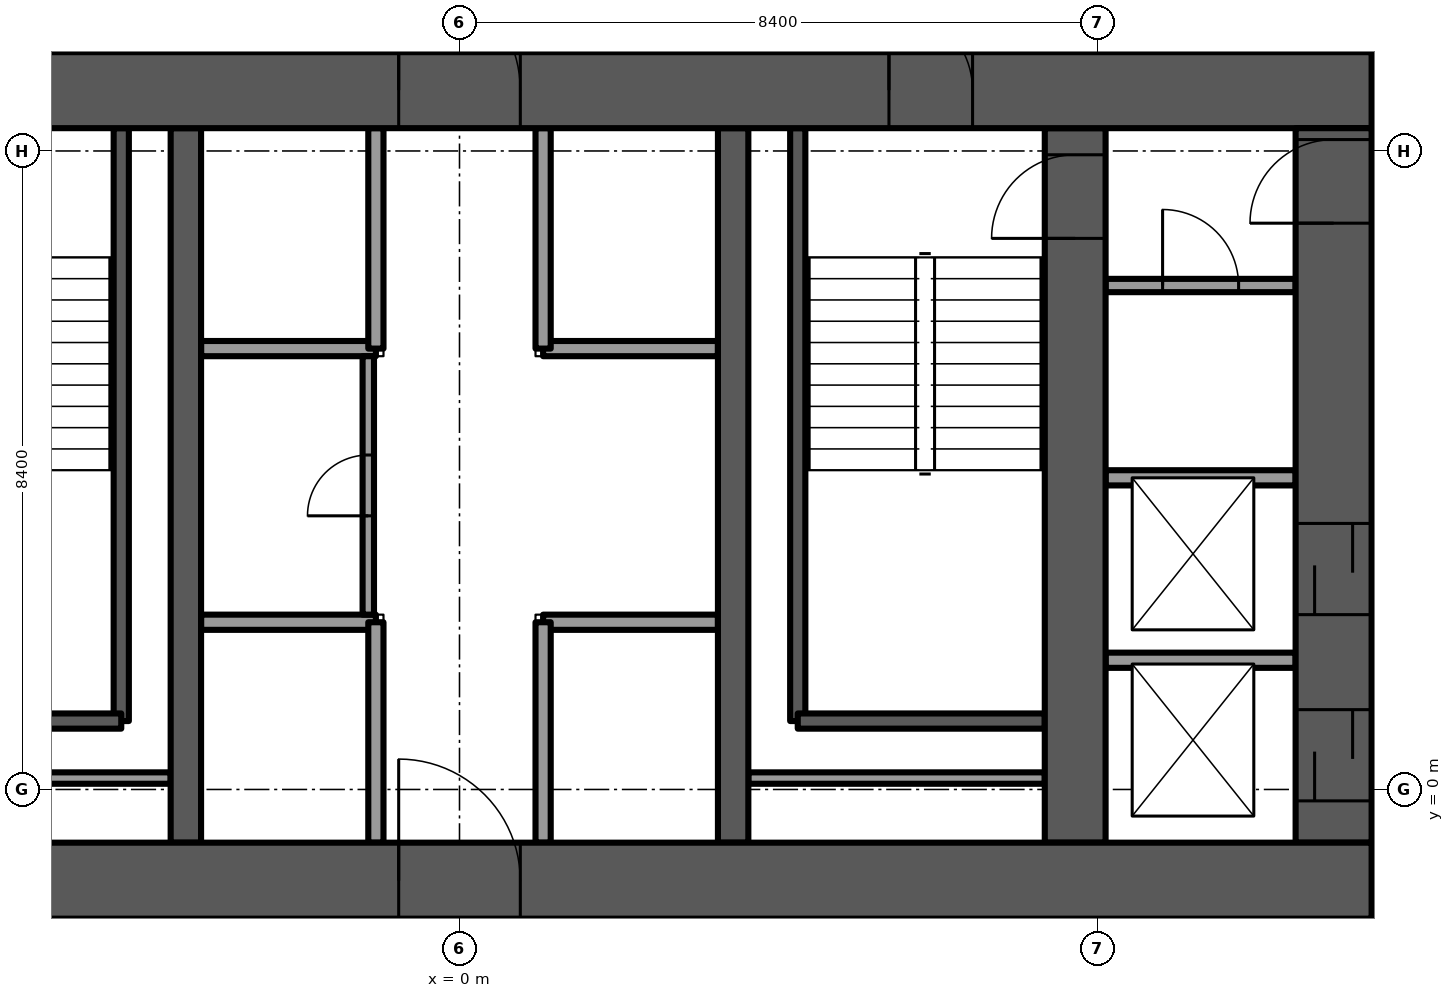
"""IFC4 building model, lengths in metres.
Left out: names, types, materials, properties, quantities, classifications, styles, units other than length and angle.
Written with IfcOpenShell. Run it as: python <this file> out.ifc"""

import sys

from ifc_helpers import new_model, si_unit, direction, frame, frame_2d, origin, place, context, subcontext, project, spatial, rectangle, extrude, element, fill, save


model = new_model("IFC4")
c1 = context("Model", 3, precision=1e-05, world=origin(), true_north=direction((0.0, 1.0)))
c2 = subcontext(c1, "Body", "Model", "MODEL_VIEW")
j1 = project(units=[si_unit("LENGTHUNIT", "METRE"), si_unit("PLANEANGLEUNIT", "RADIAN")], contexts=[c1])
p1 = place(None, origin())
s1 = spatial("IfcSite", under=j1, at=p1, CompositionType="ELEMENT")
p2 = place(p1, origin())
s2 = spatial("IfcBuilding", under=s1, at=p2, CompositionType="ELEMENT")
p3 = place(p2, frame((0.0, 0.0, 116.0)))
s3 = spatial("IfcBuildingStorey", under=s2, at=p3, CompositionType="ELEMENT", Elevation=116.0)
p4 = place(p3, frame((-12.0, -1.2, -0.3), z_axis=(0.0, 0.0, 1.0), x_axis=(1.0, 0.0, 0.0)))
e1 = element("IfcWall", 1, at=p4, inside=s3, PredefinedType="SHEAR", context=c2, shape_type="SweptSolid", body=[
    extrude(rectangle(XDim=24.0, YDim=1.0, at=frame_2d((12.0, 0.0))), origin(), (0.0, 0.0, 1.0), 3.75),
])
p5 = place(p4, frame((11.2, 0.0, 0.0)))
e2 = element("IfcOpeningElement", 2, at=p5, cuts=e1, PredefinedType="OPENING", context=c2, shape_type="SweptSolid", body=[
    extrude(rectangle(XDim=1.6, YDim=2.1, at=frame_2d((0.8, 1.05))), frame((0.0, 0.5, 0.0), z_axis=(0.0, -1.0, 0.0), x_axis=(1.0, 0.0, 0.0)), (0.0, 0.0, 1.0), 1.0),
])
p6 = place(p3, frame((-12.0, 9.2, -0.3), z_axis=(0.0, 0.0, 1.0), x_axis=(1.0, 0.0, 0.0)))
e3 = element("IfcWall", 3, at=p6, inside=s3, PredefinedType="SHEAR", context=c2, shape_type="SweptSolid", body=[
    extrude(rectangle(XDim=24.0, YDim=1.0, at=frame_2d((12.0, 0.0))), origin(), (0.0, 0.0, 1.0), 3.75),
])
p7 = place(p6, frame((11.2, 0.0, 0.0)))
e4 = element("IfcOpeningElement", 4, at=p7, cuts=e3, PredefinedType="OPENING", context=c2, shape_type="SweptSolid", body=[
    extrude(rectangle(XDim=1.6, YDim=2.1, at=frame_2d((0.8, 1.05))), frame((0.0, 0.5, 0.0), z_axis=(0.0, -1.0, 0.0), x_axis=(1.0, 0.0, 0.0)), (0.0, 0.0, 1.0), 1.0),
])
p8 = place(p6, frame((5.25, 0.0, 0.0)))
e5 = element("IfcOpeningElement", 5, at=p8, cuts=e3, PredefinedType="OPENING", context=c2, shape_type="SweptSolid", body=[
    extrude(rectangle(XDim=1.1, YDim=2.1, at=frame_2d((0.55, 1.05))), frame((0.0, 0.5, 0.0), z_axis=(0.0, -1.0, 0.0), x_axis=(1.0, 0.0, 0.0)), (0.0, 0.0, 1.0), 1.0),
])
p9 = place(p6, frame((17.65, 0.0, 0.0)))
e6 = element("IfcOpeningElement", 6, at=p9, cuts=e3, PredefinedType="OPENING", context=c2, shape_type="SweptSolid", body=[
    extrude(rectangle(XDim=1.1, YDim=2.1, at=frame_2d((0.55, 1.05))), frame((0.0, 0.5, 0.0), z_axis=(0.0, -1.0, 0.0), x_axis=(1.0, 0.0, 0.0)), (0.0, 0.0, 1.0), 1.0),
])
p10 = place(p3, frame((8.1, -0.7, -0.3), z_axis=(0.0, 0.0, 1.0), x_axis=(0.0, 1.0, 0.0)))
e7 = element("IfcWall", 7, at=p10, inside=s3, PredefinedType="SHEAR", context=c2, shape_type="SweptSolid", body=[
    extrude(rectangle(XDim=9.4, YDim=0.8, at=frame_2d((4.7, 0.0))), origin(), (0.0, 0.0, 1.0), 3.75),
])
p11 = place(p10, frame((7.95, 0.0, 0.0)))
e8 = element("IfcOpeningElement", 8, at=p11, cuts=e7, PredefinedType="OPENING", context=c2, shape_type="SweptSolid", body=[
    extrude(rectangle(XDim=1.1, YDim=2.1, at=frame_2d((0.55, 1.05))), frame((0.0, 0.4, 0.0), z_axis=(0.0, -1.0, 0.0), x_axis=(1.0, 0.0, 0.0)), (0.0, 0.0, 1.0), 0.8),
])
for number, where, z_axis, x_axis in (
    (9, (-3.6, -0.7, -0.3), (0.0, 0.0, 1.0), (0.0, 1.0, 0.0)),
    (10, (3.6, -0.7, -0.3), (0.0, 0.0, 1.0), (0.0, 1.0, 0.0)),
):
    element("IfcWall", number, at=place(p3, frame(where, z_axis=z_axis, x_axis=x_axis)), inside=s3, PredefinedType="SHEAR", context=c2, shape_type="SweptSolid", body=[
        extrude(rectangle(XDim=9.4, YDim=0.4, at=frame_2d((4.7, 0.0))), origin(), (0.0, 0.0, 1.0), 3.75),
    ])
p12 = place(p3, frame((11.5, -0.7, -0.3), z_axis=(0.0, 0.0, 1.0), x_axis=(0.0, 1.0, 0.0)))
e11 = element("IfcWall", 11, at=p12, inside=s3, PredefinedType="SHEAR", context=c2, shape_type="SweptSolid", body=[
    extrude(rectangle(XDim=9.4, YDim=1.0, at=frame_2d((4.7, 0.0))), origin(), (0.0, 0.0, 1.0), 3.75),
])
p13 = place(p12, frame((8.15, 0.0, 0.0)))
e12 = element("IfcOpeningElement", 12, at=p13, cuts=e11, PredefinedType="OPENING", context=c2, shape_type="SweptSolid", body=[
    extrude(rectangle(XDim=1.1, YDim=2.1, at=frame_2d((0.55, 1.05))), frame((0.0, 0.5, 0.0), z_axis=(0.0, -1.0, 0.0), x_axis=(1.0, 0.0, 0.0)), (0.0, 0.0, 1.0), 1.0),
])
p14 = place(p12, frame((0.55, 0.0, 0.0)))
e13 = element("IfcOpeningElement", 13, at=p14, cuts=e11, PredefinedType="OPENING", context=c2, shape_type="SweptSolid", body=[
    extrude(rectangle(XDim=1.2, YDim=2.1, at=frame_2d((0.6, 1.05))), frame((0.0, 0.5, 0.0), z_axis=(0.0, -1.0, 0.0), x_axis=(1.0, 0.0, 0.0)), (0.0, 0.0, 1.0), 1.0),
])
p15 = place(p12, frame((3.0, 0.0, 0.0)))
e14 = element("IfcOpeningElement", 14, at=p15, cuts=e11, PredefinedType="OPENING", context=c2, shape_type="SweptSolid", body=[
    extrude(rectangle(XDim=1.2, YDim=2.1, at=frame_2d((0.6, 1.05))), frame((0.0, 0.5, 0.0), z_axis=(0.0, -1.0, 0.0), x_axis=(1.0, 0.0, 0.0)), (0.0, 0.0, 1.0), 1.0),
])
p16 = place(p3, frame((10.463, -15.727, 0.0), z_axis=(0.0, 0.0, 1.0), x_axis=(0.499992448691, 0.866029763491, 0.0)))
e15 = element("IfcWall", 15, at=p16, inside=s3, PredefinedType="SOLIDWALL", context=c2, shape_type="SweptSolid", body=[
    extrude(rectangle(XDim=16.777, YDim=0.15, at=frame_2d((8.388, 0.0))), origin(), (0.0, 0.0, 1.0), 3.45),
])
p17 = place(p16, frame((2.388, 0.0, 0.15)))
e16 = element("IfcOpeningElement", 16, at=p17, cuts=e15, PredefinedType="OPENING", context=c2, shape_type="SweptSolid", body=[
    extrude(rectangle(XDim=1.7, YDim=2.85, at=frame_2d((0.85, 1.425))), frame((0.0, 0.075, 0.0), z_axis=(0.0, -1.0, 0.0), x_axis=(1.0, 0.0, 0.0)), (0.0, 0.0, 1.0), 0.15),
])
p18 = place(p16, frame((4.488, 0.0, 0.0)))
e17 = element("IfcOpeningElement", 17, at=p18, cuts=e15, PredefinedType="OPENING", context=c2, shape_type="SweptSolid", body=[
    extrude(rectangle(XDim=1.5, YDim=2.4, at=frame_2d((0.75, 1.2))), frame((0.0, 0.075, 0.0), z_axis=(0.0, -1.0, 0.0), x_axis=(1.0, 0.0, 0.0)), (0.0, 0.0, 1.0), 0.15),
])
p19 = place(p16, frame((6.588, 0.0, 0.15)))
e18 = element("IfcOpeningElement", 18, at=p19, cuts=e15, PredefinedType="OPENING", context=c2, shape_type="SweptSolid", body=[
    extrude(rectangle(XDim=1.7, YDim=2.85, at=frame_2d((0.85, 1.425))), frame((0.0, 0.075, 0.0), z_axis=(0.0, -1.0, 0.0), x_axis=(1.0, 0.0, 0.0)), (0.0, 0.0, 1.0), 0.15),
])
p20 = place(p16, frame((8.511, 0.0, 0.0)))
e19 = element("IfcOpeningElement", 19, at=p20, cuts=e15, PredefinedType="OPENING", context=c2, shape_type="SweptSolid", body=[
    extrude(rectangle(XDim=1.5, YDim=2.4, at=frame_2d((0.75, 1.2))), frame((0.0, 0.075, 0.0), z_axis=(0.0, -1.0, 0.0), x_axis=(1.0, 0.0, 0.0)), (0.0, 0.0, 1.0), 0.15),
])
p21 = place(p16, frame((12.063, 0.0, 0.15)))
e20 = element("IfcOpeningElement", 20, at=p21, cuts=e15, PredefinedType="OPENING", context=c2, shape_type="SweptSolid", body=[
    extrude(rectangle(XDim=1.5, YDim=2.85, at=frame_2d((0.75, 1.425))), frame((0.0, 0.075, 0.0), z_axis=(0.0, -1.0, 0.0), x_axis=(1.0, 0.0, 0.0)), (0.0, 0.0, 1.0), 0.15),
])
p22 = place(p16, frame((0.544, 0.0, 0.15)))
e21 = element("IfcOpeningElement", 21, at=p22, cuts=e15, PredefinedType="OPENING", context=c2, shape_type="SweptSolid", body=[
    extrude(rectangle(XDim=0.9, YDim=2.73, at=frame_2d((0.45, 1.365))), frame((0.0, 0.075, 0.0), z_axis=(0.0, -1.0, 0.0), x_axis=(1.0, 0.0, 0.0)), (0.0, 0.0, 1.0), 0.15),
])
p23 = place(p16, frame((15.333, 0.0, 0.15)))
e22 = element("IfcOpeningElement", 22, at=p23, cuts=e15, PredefinedType="OPENING", context=c2, shape_type="SweptSolid", body=[
    extrude(rectangle(XDim=0.9, YDim=2.73, at=frame_2d((0.45, 1.365))), frame((0.0, 0.075, 0.0), z_axis=(0.0, -1.0, 0.0), x_axis=(1.0, 0.0, 0.0)), (0.0, 0.0, 1.0), 0.15),
])
p24 = place(p3, frame((18.852, -0.133, 0.0), z_axis=(0.0, 0.0, 1.0), x_axis=(-0.499994842654, 0.866028381359, 0.0)))
e23 = element("IfcWall", 23, at=p24, inside=s3, PredefinedType="SOLIDWALL", context=c2, shape_type="SweptSolid", body=[
    extrude(rectangle(XDim=21.853, YDim=0.15, at=frame_2d((10.927, 0.0))), origin(), (0.0, 0.0, 1.0), 3.45),
])
p25 = place(p24, frame((1.441, 0.0, 0.15)))
e24 = element("IfcOpeningElement", 24, at=p25, cuts=e23, PredefinedType="OPENING", context=c2, shape_type="SweptSolid", body=[
    extrude(rectangle(XDim=1.7, YDim=2.85, at=frame_2d((0.85, 1.425))), frame((0.0, 0.075, 0.0), z_axis=(0.0, -1.0, 0.0), x_axis=(1.0, 0.0, 0.0)), (0.0, 0.0, 1.0), 0.15),
])
p26 = place(p24, frame((3.541, 0.0, 0.15)))
e25 = element("IfcOpeningElement", 25, at=p26, cuts=e23, PredefinedType="OPENING", context=c2, shape_type="SweptSolid", body=[
    extrude(rectangle(XDim=1.5, YDim=2.85, at=frame_2d((0.75, 1.425))), frame((0.0, 0.075, 0.0), z_axis=(0.0, -1.0, 0.0), x_axis=(1.0, 0.0, 0.0)), (0.0, 0.0, 1.0), 0.15),
])
p27 = place(p24, frame((5.641, 0.0, 0.15)))
e26 = element("IfcOpeningElement", 26, at=p27, cuts=e23, PredefinedType="OPENING", context=c2, shape_type="SweptSolid", body=[
    extrude(rectangle(XDim=1.7, YDim=2.85, at=frame_2d((0.85, 1.425))), frame((0.0, 0.075, 0.0), z_axis=(0.0, -1.0, 0.0), x_axis=(1.0, 0.0, 0.0)), (0.0, 0.0, 1.0), 0.15),
])
p28 = place(p24, frame((7.741, 0.0, 0.15)))
e27 = element("IfcOpeningElement", 27, at=p28, cuts=e23, PredefinedType="OPENING", context=c2, shape_type="SweptSolid", body=[
    extrude(rectangle(XDim=1.5, YDim=2.85, at=frame_2d((0.75, 1.425))), frame((0.0, 0.075, 0.0), z_axis=(0.0, -1.0, 0.0), x_axis=(1.0, 0.0, 0.0)), (0.0, 0.0, 1.0), 0.15),
])
p29 = place(p24, frame((10.531, 0.0, 0.15)))
e28 = element("IfcOpeningElement", 28, at=p29, cuts=e23, PredefinedType="OPENING", context=c2, shape_type="SweptSolid", body=[
    extrude(rectangle(XDim=0.9, YDim=2.85, at=frame_2d((0.45, 1.425))), frame((0.0, 0.075, 0.0), z_axis=(0.0, -1.0, 0.0), x_axis=(1.0, 0.0, 0.0)), (0.0, 0.0, 1.0), 0.15),
])
p30 = place(p24, frame((14.041, 0.0, 0.15)))
e29 = element("IfcOpeningElement", 29, at=p30, cuts=e23, PredefinedType="OPENING", context=c2, shape_type="SweptSolid", body=[
    extrude(rectangle(XDim=0.9, YDim=2.85, at=frame_2d((0.45, 1.425))), frame((0.0, 0.075, 0.0), z_axis=(0.0, -1.0, 0.0), x_axis=(1.0, 0.0, 0.0)), (0.0, 0.0, 1.0), 0.15),
])
p31 = place(p24, frame((19.132, 0.0, 0.15)))
e30 = element("IfcOpeningElement", 30, at=p31, cuts=e23, PredefinedType="OPENING", context=c2, shape_type="SweptSolid", body=[
    extrude(rectangle(XDim=1.7, YDim=2.73, at=frame_2d((0.85, 1.365))), frame((0.0, 0.075, 0.0), z_axis=(0.0, -1.0, 0.0), x_axis=(1.0, 0.0, 0.0)), (0.0, 0.0, 1.0), 0.15),
])
for number, where, z_axis, x_axis in (
    (31, (-3.4, 2.2, 0.0), (0.0, 0.0, 1.0), (1.0, 0.0, 0.0)),
    (32, (-3.4, 5.8, 0.0), (0.0, 0.0, 1.0), (1.0, 0.0, 0.0)),
    (33, (1.1, 2.2, 0.0), (0.0, 0.0, 1.0), (1.0, 0.0, 0.0)),
    (34, (1.1, 5.8, 0.0), (0.0, 0.0, 1.0), (1.0, 0.0, 0.0)),
):
    element("IfcWall", number, at=place(p3, frame(where, z_axis=z_axis, x_axis=x_axis)), inside=s3, PredefinedType="PARTITIONING", context=c2, shape_type="SweptSolid", body=[
        extrude(rectangle(XDim=2.3, YDim=0.2, at=frame_2d((1.15, 0.0))), origin(), (0.0, 0.0, 1.0), 3.45),
    ])
for number, where, z_axis, x_axis in (
    (35, (-1.1, -0.7, 0.0), (0.0, 0.0, 1.0), (0.0, 1.0, 0.0)),
    (36, (1.1, -0.7, 0.0), (0.0, 0.0, 1.0), (0.0, 1.0, 0.0)),
    (37, (-1.1, 5.8, 0.0), (0.0, 0.0, 1.0), (0.0, 1.0, 0.0)),
    (38, (1.1, 5.8, 0.0), (0.0, 0.0, 1.0), (0.0, 1.0, 0.0)),
):
    element("IfcWall", number, at=place(p3, frame(where, z_axis=z_axis, x_axis=x_axis)), inside=s3, PredefinedType="PARTITIONING", context=c2, shape_type="SweptSolid", body=[
        extrude(rectangle(XDim=2.9, YDim=0.2, at=frame_2d((1.45, 0.0))), origin(), (0.0, 0.0, 1.0), 3.45),
    ])
p32 = place(p3, frame((-4.45, 0.9, -0.3), z_axis=(0.0, 0.0, 1.0), x_axis=(0.0, 1.0, 0.0)))
e39 = element("IfcWall", 39, at=p32, inside=s3, PredefinedType="SOLIDWALL", context=c2, shape_type="SweptSolid", body=[
    extrude(rectangle(XDim=7.8, YDim=0.2, at=frame_2d((3.9, 0.0))), origin(), (0.0, 0.0, 1.0), 3.75),
])
p33 = place(p3, frame((-7.7, 0.9, -0.3), z_axis=(0.0, 0.0, 1.0), x_axis=(1.0, 0.0, 0.0)))
e40 = element("IfcWall", 40, at=p33, inside=s3, PredefinedType="SOLIDWALL", context=c2, shape_type="SweptSolid", body=[
    extrude(rectangle(XDim=3.25, YDim=0.2, at=frame_2d((1.625, 0.0))), origin(), (0.0, 0.0, 1.0), 3.75),
])
p34 = place(p3, frame((-7.7, 0.15, 0.0), z_axis=(0.0, 0.0, 1.0), x_axis=(1.0, 0.0, 0.0)))
e41 = element("IfcWall", 41, at=p34, inside=s3, PredefinedType="PARTITIONING", context=c2, shape_type="SweptSolid", body=[
    extrude(rectangle(XDim=3.9, YDim=0.15, at=frame_2d((1.95, 0.0))), origin(), (0.0, 0.0, 1.0), 3.45),
])
p35 = place(p3, frame((4.45, 0.9, -0.3), z_axis=(0.0, 0.0, 1.0), x_axis=(0.0, 1.0, 0.0)))
e42 = element("IfcWall", 42, at=p35, inside=s3, PredefinedType="SOLIDWALL", context=c2, shape_type="SweptSolid", body=[
    extrude(rectangle(XDim=7.8, YDim=0.2, at=frame_2d((3.9, 0.0))), origin(), (0.0, 0.0, 1.0), 3.75),
])
p36 = place(p3, frame((4.45, 0.9, -0.3), z_axis=(0.0, 0.0, 1.0), x_axis=(1.0, 0.0, 0.0)))
e43 = element("IfcWall", 43, at=p36, inside=s3, PredefinedType="SOLIDWALL", context=c2, shape_type="SweptSolid", body=[
    extrude(rectangle(XDim=3.25, YDim=0.2, at=frame_2d((1.625, 0.0))), origin(), (0.0, 0.0, 1.0), 3.75),
])
p37 = place(p3, frame((3.8, 0.15, 0.0), z_axis=(0.0, 0.0, 1.0), x_axis=(1.0, 0.0, 0.0)))
e44 = element("IfcWall", 44, at=p37, inside=s3, PredefinedType="PARTITIONING", context=c2, shape_type="SweptSolid", body=[
    extrude(rectangle(XDim=3.9, YDim=0.15, at=frame_2d((1.95, 0.0))), origin(), (0.0, 0.0, 1.0), 3.45),
])
p38 = place(p3, frame((-1.2, 2.3, 0.0), z_axis=(0.0, 0.0, 1.0), x_axis=(0.0, 1.0, 0.0)))
e45 = element("IfcWall", 45, at=p38, inside=s3, PredefinedType="PARTITIONING", context=c2, shape_type="SweptSolid", body=[
    extrude(rectangle(XDim=3.4, YDim=0.15, at=frame_2d((1.7, 0.0))), origin(), (0.0, 0.0, 1.0), 3.45),
])
p39 = place(p38, frame((1.3, 0.0, 0.0)))
e46 = element("IfcOpeningElement", 46, at=p39, cuts=e45, PredefinedType="OPENING", context=c2, shape_type="SweptSolid", body=[
    extrude(rectangle(XDim=0.8, YDim=2.1, at=frame_2d((0.4, 1.05))), frame((0.0, 0.075, 0.0), z_axis=(0.0, -1.0, 0.0), x_axis=(1.0, 0.0, 0.0)), (0.0, 0.0, 1.0), 0.15),
])
for number, where, z_axis, x_axis in (
    (47, (8.5, 1.7, 0.0), (0.0, 0.0, 1.0), (1.0, 0.0, 0.0)),
    (48, (8.5, 4.1, 0.0), (0.0, 0.0, 1.0), (1.0, 0.0, 0.0)),
):
    element("IfcWall", number, at=place(p3, frame(where, z_axis=z_axis, x_axis=x_axis)), inside=s3, PredefinedType="PARTITIONING", context=c2, shape_type="SweptSolid", body=[
        extrude(rectangle(XDim=2.5, YDim=0.2, at=frame_2d((1.25, 0.0))), origin(), (0.0, 0.0, 1.0), 3.45),
    ])
p40 = place(p3, frame((8.5, 6.63, 0.0), z_axis=(0.0, 0.0, 1.0), x_axis=(1.0, 0.0, 0.0)))
e49 = element("IfcWall", 49, at=p40, inside=s3, PredefinedType="PARTITIONING", context=c2, shape_type="SweptSolid", body=[
    extrude(rectangle(XDim=2.5, YDim=0.175, at=frame_2d((1.25, 0.0))), origin(), (0.0, 0.0, 1.0), 3.45),
])
p41 = place(p40, frame((0.75, 0.0, 0.0)))
e50 = element("IfcOpeningElement", 50, at=p41, cuts=e49, PredefinedType="OPENING", context=c2, shape_type="SweptSolid", body=[
    extrude(rectangle(XDim=1.0, YDim=2.1, at=frame_2d((0.5, 1.05))), frame((0.0, 0.087, 0.0), z_axis=(0.0, -1.0, 0.0), x_axis=(1.0, 0.0, 0.0)), (0.0, 0.0, 1.0), 0.175),
])
p42 = place(p5, origin())
e51 = element("IfcDoor", 51, at=p42, inside=s3, OperationType="DOUBLE_DOOR_SINGLE_SWING", PredefinedType="DOOR", context=c2, shape_type="SweptSolid", body=[
    extrude(rectangle(XDim=1.6, YDim=2.1, at=frame_2d((0.8, 1.05))), frame((0.0, 0.025, 0.0), z_axis=(0.0, -1.0, 0.0), x_axis=(1.0, 0.0, 0.0)), (0.0, 0.0, 1.0), 0.05),
])
fill(e2, e51)
p43 = place(p7, origin())
e52 = element("IfcDoor", 52, at=p43, inside=s3, OperationType="DOUBLE_DOOR_SINGLE_SWING", PredefinedType="DOOR", context=c2, shape_type="SweptSolid", body=[
    extrude(rectangle(XDim=1.6, YDim=2.1, at=frame_2d((0.8, 1.05))), frame((0.0, 0.025, 0.0), z_axis=(0.0, -1.0, 0.0), x_axis=(1.0, 0.0, 0.0)), (0.0, 0.0, 1.0), 0.05),
])
fill(e4, e52)
p44 = place(p9, origin())
e53 = element("IfcDoor", 53, at=p44, inside=s3, OperationType="SINGLE_SWING_RIGHT", PredefinedType="DOOR", context=c2, shape_type="SweptSolid", body=[
    extrude(rectangle(XDim=1.1, YDim=2.1, at=frame_2d((0.55, 1.05))), frame((0.0, 0.025, 0.0), z_axis=(0.0, -1.0, 0.0), x_axis=(1.0, 0.0, 0.0)), (0.0, 0.0, 1.0), 0.05),
])
fill(e6, e53)
p45 = place(p11, origin())
e54 = element("IfcDoor", 54, at=p45, inside=s3, OperationType="SINGLE_SWING_LEFT", PredefinedType="DOOR", context=c2, shape_type="SweptSolid", body=[
    extrude(rectangle(XDim=1.1, YDim=2.1, at=frame_2d((0.55, 1.05))), frame((0.0, 0.025, 0.0), z_axis=(0.0, -1.0, 0.0), x_axis=(1.0, 0.0, 0.0)), (0.0, 0.0, 1.0), 0.05),
])
fill(e8, e54)
p46 = place(p39, origin())
e55 = element("IfcDoor", 55, at=p46, inside=s3, OperationType="SINGLE_SWING_LEFT", PredefinedType="DOOR", context=c2, shape_type="SweptSolid", body=[
    extrude(rectangle(XDim=0.8, YDim=2.1, at=frame_2d((0.4, 1.05))), frame((0.0, 0.025, 0.0), z_axis=(0.0, -1.0, 0.0), x_axis=(1.0, 0.0, 0.0)), (0.0, 0.0, 1.0), 0.05),
])
fill(e46, e55)
p47 = place(p41, origin())
e56 = element("IfcDoor", 56, at=p47, inside=s3, OperationType="SINGLE_SWING_RIGHT", PredefinedType="DOOR", context=c2, shape_type="SweptSolid", body=[
    extrude(rectangle(XDim=1.0, YDim=2.1, at=frame_2d((0.5, 1.05))), frame((0.0, 0.025, 0.0), z_axis=(0.0, -1.0, 0.0), x_axis=(1.0, 0.0, 0.0)), (0.0, 0.0, 1.0), 0.05),
])
fill(e50, e56)
p48 = place(p13, origin())
e57 = element("IfcDoor", 57, at=p48, inside=s3, OperationType="SINGLE_SWING_RIGHT", PredefinedType="DOOR", context=c2, shape_type="SweptSolid", body=[
    extrude(rectangle(XDim=1.1, YDim=2.1, at=frame_2d((0.55, 1.05))), frame((0.0, 0.025, 0.0), z_axis=(0.0, -1.0, 0.0), x_axis=(1.0, 0.0, 0.0)), (0.0, 0.0, 1.0), 0.05),
])
fill(e12, e57)
p49 = place(p14, origin())
e58 = element("IfcDoor", 58, at=p49, inside=s3, OperationType="SLIDING_TO_LEFT", PredefinedType="DOOR", context=c2, shape_type="SweptSolid", body=[
    extrude(rectangle(XDim=1.2, YDim=2.1, at=frame_2d((0.6, 1.05))), frame((0.0, 0.025, 0.0), z_axis=(0.0, -1.0, 0.0), x_axis=(1.0, 0.0, 0.0)), (0.0, 0.0, 1.0), 0.05),
])
fill(e13, e58)
p50 = place(p15, origin())
e59 = element("IfcDoor", 59, at=p50, inside=s3, OperationType="SLIDING_TO_LEFT", PredefinedType="DOOR", context=c2, shape_type="SweptSolid", body=[
    extrude(rectangle(XDim=1.2, YDim=2.1, at=frame_2d((0.6, 1.05))), frame((0.0, 0.025, 0.0), z_axis=(0.0, -1.0, 0.0), x_axis=(1.0, 0.0, 0.0)), (0.0, 0.0, 1.0), 0.05),
])
fill(e14, e59)
save(model, sys.argv[1])
